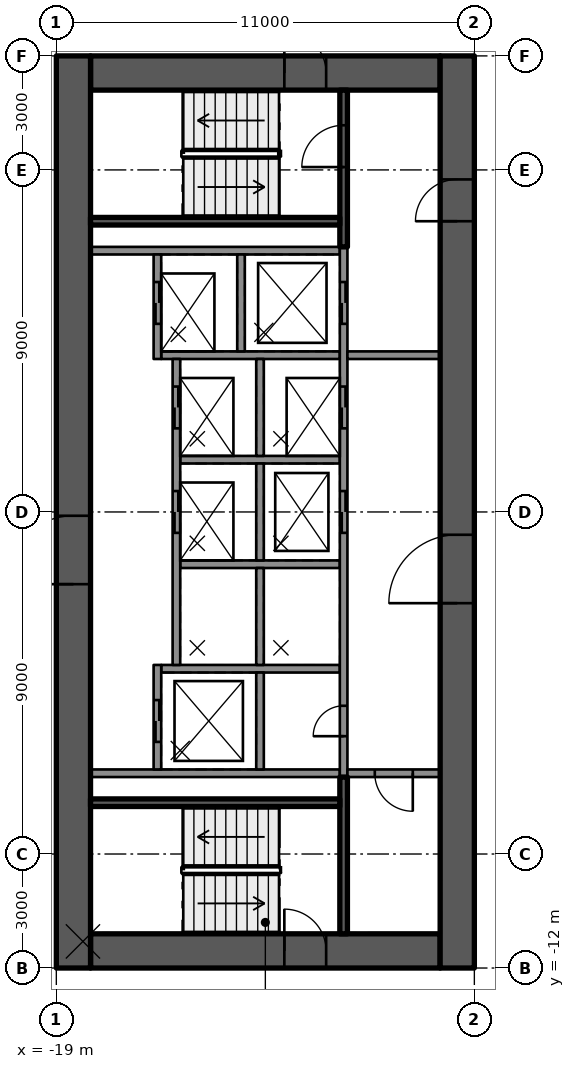
"""IFC4 building model, lengths in metres.
Left out: names, types, materials, properties, quantities, classifications, styles, units other than length and angle.
Written with IfcOpenShell. Run it as: python <this file> out.ifc"""

import sys

from ifc_helpers import new_model, si_unit, direction, frame, frame_2d, origin, place, context, subcontext, project, spatial, rectangle, extrude, element, fill, save


model = new_model("IFC4")
c1 = context("Model", 3, precision=1e-05, world=origin(), true_north=direction((0.0, 1.0)))
c2 = subcontext(c1, "Body", "Model", "MODEL_VIEW")
j1 = project(units=[si_unit("LENGTHUNIT", "METRE"), si_unit("PLANEANGLEUNIT", "RADIAN")], contexts=[c1])
p1 = place(None, origin())
s1 = spatial("IfcSite", under=j1, at=p1, CompositionType="ELEMENT")
p2 = place(p1, origin())
s2 = spatial("IfcBuilding", under=s1, at=p2, CompositionType="ELEMENT")
p3 = place(p2, frame((0.0, 0.0, 80.7)))
s3 = spatial("IfcBuildingStorey", under=s2, at=p3, CompositionType="ELEMENT", Elevation=80.7)
p4 = place(p3, frame((-18.1, 11.55, 0.0), z_axis=(0.0, 0.0, 1.0), x_axis=(1.0, 0.0, 0.0)))
e1 = element("IfcWall", 1, at=p4, inside=s3, PredefinedType="SHEAR", context=c2, shape_type="SweptSolid", body=[
    extrude(rectangle(XDim=9.2, YDim=0.9, at=frame_2d((4.6, 0.0))), origin(), (0.0, 0.0, 1.0), 3.5),
])
p5 = place(p4, frame((5.1, 0.0, 0.0)))
e2 = element("IfcOpeningElement", 2, at=p5, cuts=e1, PredefinedType="OPENING", context=c2, shape_type="SweptSolid", body=[
    extrude(rectangle(XDim=1.1, YDim=2.1, at=frame_2d((0.55, 1.05))), frame((0.0, 0.46, 0.0), z_axis=(0.0, -1.0, 0.0), x_axis=(1.0, 0.0, 0.0)), (0.0, 0.0, 1.0), 0.92),
])
p6 = place(p3, frame((-18.1, -11.55, 0.0), z_axis=(0.0, 0.0, 1.0), x_axis=(1.0, 0.0, 0.0)))
e3 = element("IfcWall", 3, at=p6, inside=s3, PredefinedType="SHEAR", context=c2, shape_type="SweptSolid", body=[
    extrude(rectangle(XDim=9.2, YDim=0.9, at=frame_2d((4.6, 0.0))), origin(), (0.0, 0.0, 1.0), 3.5),
])
p7 = place(p6, frame((5.1, 0.0, 0.0)))
e4 = element("IfcOpeningElement", 4, at=p7, cuts=e3, PredefinedType="OPENING", context=c2, shape_type="SweptSolid", body=[
    extrude(rectangle(XDim=1.1, YDim=2.1, at=frame_2d((0.55, 1.05))), frame((0.0, 0.46, 0.0), z_axis=(0.0, -1.0, 0.0), x_axis=(1.0, 0.0, 0.0)), (0.0, 0.0, 1.0), 0.92),
])
p8 = place(p3, frame((-18.55, -12.0, 0.0), z_axis=(0.0, 0.0, 1.0), x_axis=(0.0, 1.0, 0.0)))
e5 = element("IfcWall", 5, at=p8, inside=s3, PredefinedType="SHEAR", context=c2, shape_type="SweptSolid", body=[
    extrude(rectangle(XDim=24.0, YDim=0.9, at=frame_2d((12.0, 0.0))), origin(), (0.0, 0.0, 1.0), 3.5),
])
p9 = place(p8, frame((10.1, 0.0, 0.0)))
e6 = element("IfcOpeningElement", 6, at=p9, cuts=e5, PredefinedType="OPENING", context=c2, shape_type="SweptSolid", body=[
    extrude(rectangle(XDim=1.8, YDim=2.1, at=frame_2d((0.9, 1.05))), frame((0.0, 0.46, 0.0), z_axis=(0.0, -1.0, 0.0), x_axis=(1.0, 0.0, 0.0)), (0.0, 0.0, 1.0), 0.92),
])
p10 = place(p3, frame((-8.45, -12.0, 0.0), z_axis=(0.0, 0.0, 1.0), x_axis=(0.0, 1.0, 0.0)))
e7 = element("IfcWall", 7, at=p10, inside=s3, PredefinedType="SHEAR", context=c2, shape_type="SweptSolid", body=[
    extrude(rectangle(XDim=24.0, YDim=0.9, at=frame_2d((12.0, 0.0))), origin(), (0.0, 0.0, 1.0), 3.5),
])
p11 = place(p10, frame((9.6, 0.0, 0.0)))
e8 = element("IfcOpeningElement", 8, at=p11, cuts=e7, PredefinedType="OPENING", context=c2, shape_type="SweptSolid", body=[
    extrude(rectangle(XDim=1.8, YDim=2.1, at=frame_2d((0.9, 1.05))), frame((0.0, 0.46, 0.0), z_axis=(0.0, -1.0, 0.0), x_axis=(1.0, 0.0, 0.0)), (0.0, 0.0, 1.0), 0.92),
])
p12 = place(p10, frame((19.65, 0.0, 0.0)))
e9 = element("IfcOpeningElement", 9, at=p12, cuts=e7, PredefinedType="OPENING", context=c2, shape_type="SweptSolid", body=[
    extrude(rectangle(XDim=1.1, YDim=2.1, at=frame_2d((0.55, 1.05))), frame((0.0, 0.46, 0.0), z_axis=(0.0, -1.0, 0.0), x_axis=(1.0, 0.0, 0.0)), (0.0, 0.0, 1.0), 0.92),
])
for number, where, z_axis, x_axis in (
    (10, (-11.54, 6.875, 0.0), (0.0, 0.0, 1.0), (-1.0, 0.0, 0.0)),
    (11, (-11.54, -6.875, 0.0), (0.0, 0.0, 1.0), (-1.0, 0.0, 0.0)),
):
    element("IfcWall", number, at=place(p3, frame(where, z_axis=z_axis, x_axis=x_axis)), inside=s3, PredefinedType="SOLIDWALL", context=c2, shape_type="SweptSolid", body=[
        extrude(rectangle(XDim=6.56, YDim=0.2, at=frame_2d((3.28, 0.0))), origin(), (0.0, 0.0, 1.0), 3.09),
    ])
p13 = place(p3, frame((-11.54, -4.125, 0.0), z_axis=(0.0, 0.0, 1.0), x_axis=(-1.0, 0.0, 0.0)))
e12 = element("IfcWall", 12, at=p13, inside=s3, PredefinedType="SOLIDWALL", context=c2, shape_type="SweptSolid", body=[
    extrude(rectangle(XDim=4.7, YDim=0.2, at=frame_2d((2.35, 0.0))), origin(), (0.0, 0.0, 1.0), 3.09),
])
for number, where, z_axis, x_axis in (
    (13, (-11.54, -1.375, 0.0), (0.0, 0.0, 1.0), (-1.0, 0.0, 0.0)),
    (14, (-11.54, 1.375, 0.0), (0.0, 0.0, 1.0), (-1.0, 0.0, 0.0)),
):
    element("IfcWall", number, at=place(p3, frame(where, z_axis=z_axis, x_axis=x_axis)), inside=s3, PredefinedType="SOLIDWALL", context=c2, shape_type="SweptSolid", body=[
        extrude(rectangle(XDim=4.2, YDim=0.2, at=frame_2d((2.1, 0.0))), origin(), (0.0, 0.0, 1.0), 3.09),
    ])
p14 = place(p3, frame((-11.54, 4.125, 0.0), z_axis=(0.0, 0.0, 1.0), x_axis=(-1.0, 0.0, 0.0)))
e15 = element("IfcWall", 15, at=p14, inside=s3, PredefinedType="SOLIDWALL", context=c2, shape_type="SweptSolid", body=[
    extrude(rectangle(XDim=4.7, YDim=0.2, at=frame_2d((2.35, 0.0))), origin(), (0.0, 0.0, 1.0), 3.09),
])
p15 = place(p3, frame((-11.44, -6.975, 0.0), z_axis=(0.0, 0.0, 1.0), x_axis=(0.0, 1.0, 0.0)))
e16 = element("IfcWall", 16, at=p15, inside=s3, PredefinedType="SOLIDWALL", context=c2, shape_type="SweptSolid", body=[
    extrude(rectangle(XDim=13.95, YDim=0.2, at=frame_2d((6.975, 0.0))), origin(), (0.0, 0.0, 1.0), 3.09),
])
p16 = place(p15, frame((6.425, 0.0, 0.0)))
e17 = element("IfcOpeningElement", 17, at=p16, cuts=e16, PredefinedType="OPENING", context=c2, shape_type="SweptSolid", body=[
    extrude(rectangle(XDim=1.1, YDim=2.1, at=frame_2d((0.55, 1.05))), frame((0.0, 0.11, 0.0), z_axis=(0.0, -1.0, 0.0), x_axis=(1.0, 0.0, 0.0)), (0.0, 0.0, 1.0), 0.22),
])
p17 = place(p15, frame((9.175, 0.0, 0.0)))
e18 = element("IfcOpeningElement", 18, at=p17, cuts=e16, PredefinedType="OPENING", context=c2, shape_type="SweptSolid", body=[
    extrude(rectangle(XDim=1.1, YDim=2.1, at=frame_2d((0.55, 1.05))), frame((0.0, 0.11, 0.0), z_axis=(0.0, -1.0, 0.0), x_axis=(1.0, 0.0, 0.0)), (0.0, 0.0, 1.0), 0.22),
])
p18 = place(p15, frame((11.925, 0.0, 0.0)))
e19 = element("IfcOpeningElement", 19, at=p18, cuts=e16, PredefinedType="OPENING", context=c2, shape_type="SweptSolid", body=[
    extrude(rectangle(XDim=1.1, YDim=2.1, at=frame_2d((0.55, 1.05))), frame((0.0, 0.11, 0.0), z_axis=(0.0, -1.0, 0.0), x_axis=(1.0, 0.0, 0.0)), (0.0, 0.0, 1.0), 0.22),
])
p19 = place(p15, frame((1.075, 0.0, 0.0)))
e20 = element("IfcOpeningElement", 20, at=p19, cuts=e16, PredefinedType="OPENING", context=c2, shape_type="SweptSolid", body=[
    extrude(rectangle(XDim=0.8, YDim=2.1, at=frame_2d((0.4, 1.05))), frame((0.0, 0.11, 0.0), z_axis=(0.0, -1.0, 0.0), x_axis=(1.0, 0.0, 0.0)), (0.0, 0.0, 1.0), 0.22),
])
for number, where, z_axis, x_axis in (
    (21, (-13.64, -6.775, 0.0), (0.0, 0.0, 1.0), (0.0, 1.0, 0.0)),
    (22, (-13.64, -4.025, 0.0), (0.0, 0.0, 1.0), (0.0, 1.0, 0.0)),
    (23, (-13.64, -1.275, 0.0), (0.0, 0.0, 1.0), (0.0, 1.0, 0.0)),
    (24, (-13.64, 1.475, 0.0), (0.0, 0.0, 1.0), (0.0, 1.0, 0.0)),
    (25, (-14.14, 4.225, 0.0), (0.0, 0.0, 1.0), (0.0, 1.0, 0.0)),
):
    element("IfcWall", number, at=place(p3, frame(where, z_axis=z_axis, x_axis=x_axis)), inside=s3, PredefinedType="SOLIDWALL", context=c2, shape_type="SweptSolid", body=[
        extrude(rectangle(XDim=2.55, YDim=0.2, at=frame_2d((1.275, 0.0))), origin(), (0.0, 0.0, 1.0), 3.09),
    ])
p20 = place(p3, frame((-16.34, -6.775, 0.0), z_axis=(0.0, 0.0, 1.0), x_axis=(0.0, 1.0, 0.0)))
e26 = element("IfcWall", 26, at=p20, inside=s3, PredefinedType="SOLIDWALL", context=c2, shape_type="SweptSolid", body=[
    extrude(rectangle(XDim=2.75, YDim=0.2, at=frame_2d((1.375, 0.0))), origin(), (0.0, 0.0, 1.0), 3.09),
])
p21 = place(p20, frame((0.725, 0.0, 0.0)))
e27 = element("IfcOpeningElement", 27, at=p21, cuts=e26, PredefinedType="OPENING", context=c2, shape_type="SweptSolid", body=[
    extrude(rectangle(XDim=1.1, YDim=2.1, at=frame_2d((0.55, 1.05))), frame((0.0, 0.11, 0.0), z_axis=(0.0, -1.0, 0.0), x_axis=(1.0, 0.0, 0.0)), (0.0, 0.0, 1.0), 0.22),
])
p22 = place(p3, frame((-15.84, -4.025, 0.0), z_axis=(0.0, 0.0, 1.0), x_axis=(0.0, 1.0, 0.0)))
e28 = element("IfcWall", 28, at=p22, inside=s3, PredefinedType="SOLIDWALL", context=c2, shape_type="SweptSolid", body=[
    extrude(rectangle(XDim=8.05, YDim=0.2, at=frame_2d((4.025, 0.0))), origin(), (0.0, 0.0, 1.0), 3.09),
])
p23 = place(p22, frame((3.475, 0.0, 0.0)))
e29 = element("IfcOpeningElement", 29, at=p23, cuts=e28, PredefinedType="OPENING", context=c2, shape_type="SweptSolid", body=[
    extrude(rectangle(XDim=1.1, YDim=2.1, at=frame_2d((0.55, 1.05))), frame((0.0, 0.11, 0.0), z_axis=(0.0, -1.0, 0.0), x_axis=(1.0, 0.0, 0.0)), (0.0, 0.0, 1.0), 0.22),
])
p24 = place(p22, frame((6.225, 0.0, 0.0)))
e30 = element("IfcOpeningElement", 30, at=p24, cuts=e28, PredefinedType="OPENING", context=c2, shape_type="SweptSolid", body=[
    extrude(rectangle(XDim=1.1, YDim=2.1, at=frame_2d((0.55, 1.05))), frame((0.0, 0.11, 0.0), z_axis=(0.0, -1.0, 0.0), x_axis=(1.0, 0.0, 0.0)), (0.0, 0.0, 1.0), 0.22),
])
p25 = place(p3, frame((-16.34, 4.025, 0.0), z_axis=(0.0, 0.0, 1.0), x_axis=(0.0, 1.0, 0.0)))
e31 = element("IfcWall", 31, at=p25, inside=s3, PredefinedType="SOLIDWALL", context=c2, shape_type="SweptSolid", body=[
    extrude(rectangle(XDim=2.75, YDim=0.2, at=frame_2d((1.375, 0.0))), origin(), (0.0, 0.0, 1.0), 3.09),
])
p26 = place(p25, frame((0.925, 0.0, 0.0)))
e32 = element("IfcOpeningElement", 32, at=p26, cuts=e31, PredefinedType="OPENING", context=c2, shape_type="SweptSolid", body=[
    extrude(rectangle(XDim=1.1, YDim=2.1, at=frame_2d((0.55, 1.05))), frame((0.0, 0.11, 0.0), z_axis=(0.0, -1.0, 0.0), x_axis=(1.0, 0.0, 0.0)), (0.0, 0.0, 1.0), 0.22),
])
p27 = place(p3, frame((-11.44, 6.975, 0.0), z_axis=(0.0, 0.0, 1.0), x_axis=(0.0, 1.0, 0.0)))
e33 = element("IfcWall", 33, at=p27, inside=s3, PredefinedType="SOLIDWALL", context=c2, shape_type="SweptSolid", body=[
    extrude(rectangle(XDim=4.125, YDim=0.2, at=frame_2d((2.062, 0.0))), origin(), (0.0, 0.0, 1.0), 3.09),
])
p28 = place(p27, frame((2.1, 0.0, 0.0)))
e34 = element("IfcOpeningElement", 34, at=p28, cuts=e33, PredefinedType="OPENING", context=c2, shape_type="SweptSolid", body=[
    extrude(rectangle(XDim=1.1, YDim=2.1, at=frame_2d((0.55, 1.05))), frame((0.0, 0.11, 0.0), z_axis=(0.0, -1.0, 0.0), x_axis=(1.0, 0.0, 0.0)), (0.0, 0.0, 1.0), 0.22),
])
p29 = place(p3, frame((-11.54, 7.65, 0.0), z_axis=(0.0, 0.0, 1.0), x_axis=(-1.0, 0.0, 0.0)))
e35 = element("IfcWall", 35, at=p29, inside=s3, PredefinedType="SOLIDWALL", context=c2, shape_type="SweptSolid", body=[
    extrude(rectangle(XDim=6.56, YDim=0.2, at=frame_2d((3.28, 0.0))), origin(), (0.0, 0.0, 1.0), 3.09),
])
p30 = place(p3, frame((-11.44, -11.1, 0.0), z_axis=(0.0, 0.0, 1.0), x_axis=(0.0, 1.0, 0.0)))
e36 = element("IfcWall", 36, at=p30, inside=s3, PredefinedType="SOLIDWALL", context=c2, shape_type="SweptSolid", body=[
    extrude(rectangle(XDim=4.125, YDim=0.2, at=frame_2d((2.062, 0.0))), origin(), (0.0, 0.0, 1.0), 3.09),
])
p31 = place(p3, frame((-11.54, -7.65, 0.0), z_axis=(0.0, 0.0, 1.0), x_axis=(-1.0, 0.0, 0.0)))
e37 = element("IfcWall", 37, at=p31, inside=s3, PredefinedType="SOLIDWALL", context=c2, shape_type="SweptSolid", body=[
    extrude(rectangle(XDim=6.56, YDim=0.2, at=frame_2d((3.28, 0.0))), origin(), (0.0, 0.0, 1.0), 3.09),
])
p32 = place(p3, frame((-8.9, 4.125, 0.0), z_axis=(0.0, 0.0, 1.0), x_axis=(-1.0, 0.0, 0.0)))
e38 = element("IfcWall", 38, at=p32, inside=s3, PredefinedType="PARTITIONING", context=c2, shape_type="SweptSolid", body=[
    extrude(rectangle(XDim=2.44, YDim=0.2, at=frame_2d((1.22, 0.0))), origin(), (0.0, 0.0, 1.0), 3.09),
])
p33 = place(p3, frame((-8.9, -6.875, 0.0), z_axis=(0.0, 0.0, 1.0), x_axis=(-1.0, 0.0, 0.0)))
e39 = element("IfcWall", 39, at=p33, inside=s3, PredefinedType="PARTITIONING", context=c2, shape_type="SweptSolid", body=[
    extrude(rectangle(XDim=2.44, YDim=0.2, at=frame_2d((1.22, 0.0))), origin(), (0.0, 0.0, 1.0), 3.09),
])
p34 = place(p33, frame((0.72, 0.0, 0.0)))
e40 = element("IfcOpeningElement", 40, at=p34, cuts=e39, PredefinedType="OPENING", context=c2, shape_type="SweptSolid", body=[
    extrude(rectangle(XDim=1.0, YDim=2.1, at=frame_2d((0.5, 1.05))), frame((0.0, 0.11, 0.0), z_axis=(0.0, -1.0, 0.0), x_axis=(1.0, 0.0, 0.0)), (0.0, 0.0, 1.0), 0.22),
])
p35 = place(p21, origin())
e41 = element("IfcDoor", 41, at=p35, inside=s3, OperationType="DOUBLE_DOOR_SLIDING", PredefinedType="DOOR", context=c2, shape_type="SweptSolid", body=[
    extrude(rectangle(XDim=1.1, YDim=2.1, at=frame_2d((0.55, 1.05))), frame((0.0, 0.025, 0.0), z_axis=(0.0, -1.0, 0.0), x_axis=(1.0, 0.0, 0.0)), (0.0, 0.0, 1.0), 0.05),
])
fill(e27, e41)
p36 = place(p16, origin())
e42 = element("IfcDoor", 42, at=p36, inside=s3, OperationType="DOUBLE_DOOR_SLIDING", PredefinedType="DOOR", context=c2, shape_type="SweptSolid", body=[
    extrude(rectangle(XDim=1.1, YDim=2.1, at=frame_2d((0.55, 1.05))), frame((0.0, 0.025, 0.0), z_axis=(0.0, -1.0, 0.0), x_axis=(1.0, 0.0, 0.0)), (0.0, 0.0, 1.0), 0.05),
])
fill(e17, e42)
p37 = place(p23, origin())
e43 = element("IfcDoor", 43, at=p37, inside=s3, OperationType="DOUBLE_DOOR_SLIDING", PredefinedType="DOOR", context=c2, shape_type="SweptSolid", body=[
    extrude(rectangle(XDim=1.1, YDim=2.1, at=frame_2d((0.55, 1.05))), frame((0.0, 0.025, 0.0), z_axis=(0.0, -1.0, 0.0), x_axis=(1.0, 0.0, 0.0)), (0.0, 0.0, 1.0), 0.05),
])
fill(e29, e43)
p38 = place(p17, origin())
e44 = element("IfcDoor", 44, at=p38, inside=s3, OperationType="DOUBLE_DOOR_SLIDING", PredefinedType="DOOR", context=c2, shape_type="SweptSolid", body=[
    extrude(rectangle(XDim=1.1, YDim=2.1, at=frame_2d((0.55, 1.05))), frame((0.0, 0.025, 0.0), z_axis=(0.0, -1.0, 0.0), x_axis=(1.0, 0.0, 0.0)), (0.0, 0.0, 1.0), 0.05),
])
fill(e18, e44)
p39 = place(p24, origin())
e45 = element("IfcDoor", 45, at=p39, inside=s3, OperationType="DOUBLE_DOOR_SLIDING", PredefinedType="DOOR", context=c2, shape_type="SweptSolid", body=[
    extrude(rectangle(XDim=1.1, YDim=2.1, at=frame_2d((0.55, 1.05))), frame((0.0, 0.025, 0.0), z_axis=(0.0, -1.0, 0.0), x_axis=(1.0, 0.0, 0.0)), (0.0, 0.0, 1.0), 0.05),
])
fill(e30, e45)
p40 = place(p18, origin())
e46 = element("IfcDoor", 46, at=p40, inside=s3, OperationType="DOUBLE_DOOR_SLIDING", PredefinedType="DOOR", context=c2, shape_type="SweptSolid", body=[
    extrude(rectangle(XDim=1.1, YDim=2.1, at=frame_2d((0.55, 1.05))), frame((0.0, 0.025, 0.0), z_axis=(0.0, -1.0, 0.0), x_axis=(1.0, 0.0, 0.0)), (0.0, 0.0, 1.0), 0.05),
])
fill(e19, e46)
p41 = place(p26, origin())
e47 = element("IfcDoor", 47, at=p41, inside=s3, OperationType="DOUBLE_DOOR_SLIDING", PredefinedType="DOOR", context=c2, shape_type="SweptSolid", body=[
    extrude(rectangle(XDim=1.1, YDim=2.1, at=frame_2d((0.55, 1.05))), frame((0.0, 0.025, 0.0), z_axis=(0.0, -1.0, 0.0), x_axis=(1.0, 0.0, 0.0)), (0.0, 0.0, 1.0), 0.05),
])
fill(e32, e47)
p42 = place(p19, origin())
e48 = element("IfcDoor", 48, at=p42, inside=s3, OperationType="SINGLE_SWING_LEFT", PredefinedType="DOOR", context=c2, shape_type="SweptSolid", body=[
    extrude(rectangle(XDim=0.8, YDim=2.1, at=frame_2d((0.4, 1.05))), frame((0.0, 0.025, 0.0), z_axis=(0.0, -1.0, 0.0), x_axis=(1.0, 0.0, 0.0)), (0.0, 0.0, 1.0), 0.05),
])
fill(e20, e48)
p43 = place(p11, origin())
e49 = element("IfcDoor", 49, at=p43, inside=s3, OperationType="SINGLE_SWING_LEFT", PredefinedType="DOOR", context=c2, shape_type="SweptSolid", body=[
    extrude(rectangle(XDim=1.8, YDim=2.1, at=frame_2d((0.9, 1.05))), frame((0.0, 0.025, 0.0), z_axis=(0.0, -1.0, 0.0), x_axis=(1.0, 0.0, 0.0)), (0.0, 0.0, 1.0), 0.05),
])
fill(e8, e49)
p44 = place(p9, origin())
e50 = element("IfcDoor", 50, at=p44, inside=s3, OperationType="SINGLE_SWING_LEFT", PredefinedType="DOOR", context=c2, shape_type="SweptSolid", body=[
    extrude(rectangle(XDim=1.8, YDim=2.1, at=frame_2d((0.9, 1.05))), frame((0.0, 0.025, 0.0), z_axis=(0.0, -1.0, 0.0), x_axis=(1.0, 0.0, 0.0)), (0.0, 0.0, 1.0), 0.05),
])
fill(e6, e50)
p45 = place(p12, origin())
e51 = element("IfcDoor", 51, at=p45, inside=s3, OperationType="SINGLE_SWING_RIGHT", PredefinedType="DOOR", context=c2, shape_type="SweptSolid", body=[
    extrude(rectangle(XDim=1.1, YDim=2.1, at=frame_2d((0.55, 1.05))), frame((0.0, 0.025, 0.0), z_axis=(0.0, -1.0, 0.0), x_axis=(1.0, 0.0, 0.0)), (0.0, 0.0, 1.0), 0.05),
])
fill(e9, e51)
p46 = place(p5, origin())
e52 = element("IfcDoor", 52, at=p46, inside=s3, OperationType="SINGLE_SWING_RIGHT", PredefinedType="DOOR", context=c2, shape_type="SweptSolid", body=[
    extrude(rectangle(XDim=1.1, YDim=2.1, at=frame_2d((0.55, 1.05))), frame((0.0, 0.025, 0.0), z_axis=(0.0, -1.0, 0.0), x_axis=(1.0, 0.0, 0.0)), (0.0, 0.0, 1.0), 0.05),
])
fill(e2, e52)
p47 = place(p7, origin())
e53 = element("IfcDoor", 53, at=p47, inside=s3, OperationType="SINGLE_SWING_RIGHT", PredefinedType="DOOR", context=c2, shape_type="SweptSolid", body=[
    extrude(rectangle(XDim=1.1, YDim=2.1, at=frame_2d((0.55, 1.05))), frame((0.0, 0.025, 0.0), z_axis=(0.0, -1.0, 0.0), x_axis=(1.0, 0.0, 0.0)), (0.0, 0.0, 1.0), 0.05),
])
fill(e4, e53)
p48 = place(p28, origin())
e54 = element("IfcDoor", 54, at=p48, inside=s3, OperationType="SINGLE_SWING_RIGHT", PredefinedType="DOOR", context=c2, shape_type="SweptSolid", body=[
    extrude(rectangle(XDim=1.1, YDim=2.1, at=frame_2d((0.55, 1.05))), frame((0.0, 0.025, 0.0), z_axis=(0.0, -1.0, 0.0), x_axis=(1.0, 0.0, 0.0)), (0.0, 0.0, 1.0), 0.05),
])
fill(e34, e54)
p49 = place(p34, origin())
e55 = element("IfcDoor", 55, at=p49, inside=s3, OperationType="SINGLE_SWING_RIGHT", PredefinedType="DOOR", context=c2, shape_type="SweptSolid", body=[
    extrude(rectangle(XDim=1.0, YDim=2.1, at=frame_2d((0.5, 1.05))), frame((0.0, 0.025, 0.0), z_axis=(0.0, -1.0, 0.0), x_axis=(1.0, 0.0, 0.0)), (0.0, 0.0, 1.0), 0.05),
])
fill(e40, e55)
save(model, sys.argv[1])
